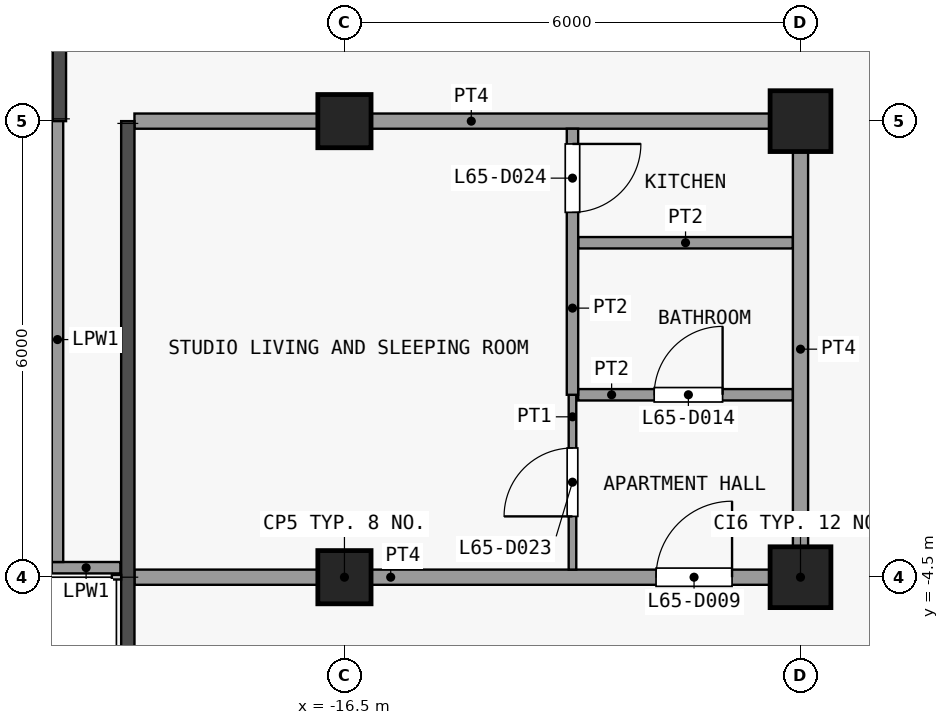
"""IFC4 building model, lengths in metres.
Left out: names, types, materials, properties, quantities, classifications, styles, units other than length and angle.
Written with IfcOpenShell. Run it as: python <this file> out.ifc"""

import sys

from ifc_helpers import new_model, si_unit, direction, frame, frame_2d, origin, origin_2d, place, context, subcontext, project, spatial, rectangle, extrude, element, fill, save


model = new_model("IFC4")
c1 = context("Model", 3, precision=1e-05, world=origin(), true_north=direction((0.0, 1.0)))
c2 = subcontext(c1, "Body", "Model", "MODEL_VIEW")
j1 = project(units=[si_unit("LENGTHUNIT", "METRE"), si_unit("PLANEANGLEUNIT", "RADIAN")], contexts=[c1])
p1 = place(None, origin())
s1 = spatial("IfcSite", under=j1, at=p1, CompositionType="ELEMENT")
p2 = place(p1, origin())
s2 = spatial("IfcBuilding", under=s1, at=p2, CompositionType="ELEMENT")
p3 = place(p2, frame((0.0, 0.0, 259.1)))
s3 = spatial("IfcBuildingStorey", under=s2, at=p3, CompositionType="ELEMENT", Elevation=259.1)
for number, where, z_axis, x_axis in (
    (1, (-16.5, -4.5, 0.0), (0.0, 0.0, 1.0), (1.0, 0.0, 0.0)),
    (2, (-16.5, 1.5, 0.0), (0.0, 0.0, 1.0), (1.0, 0.0, 0.0)),
):
    element("IfcColumn", number, at=place(p3, frame(where, z_axis=z_axis, x_axis=x_axis)), inside=s3, PredefinedType="COLUMN", context=c2, shape_type="SweptSolid", body=[
        extrude(rectangle(XDim=0.7, YDim=0.7, at=origin_2d()), origin(), (0.0, 0.0, 1.0), 3.6),
    ])
for number, where, z_axis, x_axis in (
    (3, (-10.5, -4.5, 0.0), (0.0, 0.0, 1.0), (1.0, 0.0, 0.0)),
    (4, (-10.5, 1.5, 0.0), (0.0, 0.0, 1.0), (1.0, 0.0, 0.0)),
):
    element("IfcColumn", number, at=place(p3, frame(where, z_axis=z_axis, x_axis=x_axis)), inside=s3, PredefinedType="COLUMN", context=c2, shape_type="SweptSolid", body=[
        extrude(rectangle(XDim=0.8, YDim=0.8, at=origin_2d()), origin(), (0.0, 0.0, 1.0), 3.6),
    ])
p4 = place(p3, frame((-19.448, -4.375, 0.0), z_axis=(0.0, 0.0, 1.0), x_axis=(-1.0, 0.0, 0.0)))
e5 = element("IfcWall", 5, at=p4, inside=s3, PredefinedType="PARAPET", context=c2, shape_type="SweptSolid", body=[
    extrude(rectangle(XDim=0.903, YDim=0.15, at=frame_2d((0.451, 0.0))), origin(), (0.0, 0.0, 1.0), 1.15),
])
p5 = place(p3, frame((-20.275, -4.3, 0.0), z_axis=(0.0, 0.0, 1.0), x_axis=(0.0, 1.0, 0.0)))
e6 = element("IfcWall", 6, at=p5, inside=s3, PredefinedType="PARAPET", context=c2, shape_type="SweptSolid", body=[
    extrude(rectangle(XDim=5.853, YDim=0.15, at=frame_2d((2.926, 0.0))), origin(), (0.0, 0.0, 1.0), 1.15),
])
p6 = place(p3, frame((-19.262, -4.5, 0.0), z_axis=(0.0, 0.0, 1.0), x_axis=(1.0, 0.0, 0.0)))
e7 = element("IfcWall", 7, at=p6, inside=s3, PredefinedType="PARTITIONING", context=c2, shape_type="SweptSolid", body=[
    extrude(rectangle(XDim=8.863, YDim=0.2, at=frame_2d((4.431, 0.0))), origin(), (0.0, 0.0, 1.0), 3.3),
])
p7 = place(p6, frame((6.862, 0.0, 0.0)))
e8 = element("IfcOpeningElement", 8, at=p7, cuts=e7, PredefinedType="OPENING", context=c2, shape_type="SweptSolid", body=[
    extrude(rectangle(XDim=1.0, YDim=2.1, at=frame_2d((0.5, 1.05))), frame((0.0, 0.11, 0.0), z_axis=(0.0, -1.0, 0.0), x_axis=(1.0, 0.0, 0.0)), (0.0, 0.0, 1.0), 0.22),
])
p8 = place(p3, frame((-13.425, -2.1, 0.0), z_axis=(0.0, 0.0, 1.0), x_axis=(1.0, 0.0, 0.0)))
e9 = element("IfcWall", 9, at=p8, inside=s3, PredefinedType="PARTITIONING", context=c2, shape_type="SweptSolid", body=[
    extrude(rectangle(XDim=2.825, YDim=0.15, at=frame_2d((1.413, 0.0))), origin(), (0.0, 0.0, 1.0), 3.3),
])
p9 = place(p8, frame((1.0, 0.0, 0.0)))
e10 = element("IfcOpeningElement", 10, at=p9, cuts=e9, PredefinedType="OPENING", context=c2, shape_type="SweptSolid", body=[
    extrude(rectangle(XDim=0.9, YDim=2.1, at=frame_2d((0.45, 1.05))), frame((0.0, 0.085, 0.0), z_axis=(0.0, -1.0, 0.0), x_axis=(1.0, 0.0, 0.0)), (0.0, 0.0, 1.0), 0.17),
])
p10 = place(p3, frame((-13.425, -0.1, 0.0), z_axis=(0.0, 0.0, 1.0), x_axis=(1.0, 0.0, 0.0)))
e11 = element("IfcWall", 11, at=p10, inside=s3, PredefinedType="PARTITIONING", context=c2, shape_type="SweptSolid", body=[
    extrude(rectangle(XDim=2.825, YDim=0.15, at=frame_2d((1.413, 0.0))), origin(), (0.0, 0.0, 1.0), 3.3),
])
p11 = place(p3, frame((-19.262, 1.5, 0.0), z_axis=(0.0, 0.0, 1.0), x_axis=(1.0, 0.0, 0.0)))
e12 = element("IfcWall", 12, at=p11, inside=s3, PredefinedType="PARTITIONING", context=c2, shape_type="SweptSolid", body=[
    extrude(rectangle(XDim=8.863, YDim=0.2, at=frame_2d((4.431, 0.0))), origin(), (0.0, 0.0, 1.0), 3.3),
])
p12 = place(p3, frame((-13.5, -4.4, 0.0), z_axis=(0.0, 0.0, 1.0), x_axis=(0.0, 1.0, 0.0)))
e13 = element("IfcWall", 13, at=p12, inside=s3, PredefinedType="PARTITIONING", context=c2, shape_type="SweptSolid", body=[
    extrude(rectangle(XDim=2.3, YDim=0.1, at=frame_2d((1.15, 0.0))), origin(), (0.0, 0.0, 1.0), 3.3),
])
p13 = place(p12, frame((0.7, 0.0, 0.0)))
e14 = element("IfcOpeningElement", 14, at=p13, cuts=e13, PredefinedType="OPENING", context=c2, shape_type="SweptSolid", body=[
    extrude(rectangle(XDim=0.9, YDim=2.1, at=frame_2d((0.45, 1.05))), frame((0.0, 0.06, 0.0), z_axis=(0.0, -1.0, 0.0), x_axis=(1.0, 0.0, 0.0)), (0.0, 0.0, 1.0), 0.12),
])
p14 = place(p3, frame((-13.5, -2.1, 0.0), z_axis=(0.0, 0.0, 1.0), x_axis=(0.0, 1.0, 0.0)))
e15 = element("IfcWall", 15, at=p14, inside=s3, PredefinedType="PARTITIONING", context=c2, shape_type="SweptSolid", body=[
    extrude(rectangle(XDim=3.5, YDim=0.15, at=frame_2d((1.75, 0.0))), origin(), (0.0, 0.0, 1.0), 3.3),
])
p15 = place(p14, frame((2.4, 0.0, 0.0)))
e16 = element("IfcOpeningElement", 16, at=p15, cuts=e15, PredefinedType="OPENING", context=c2, shape_type="SweptSolid", body=[
    extrude(rectangle(XDim=0.9, YDim=2.1, at=frame_2d((0.45, 1.05))), frame((0.0, 0.085, 0.0), z_axis=(0.0, -1.0, 0.0), x_axis=(1.0, 0.0, 0.0)), (0.0, 0.0, 1.0), 0.17),
])
p16 = place(p3, frame((-10.5, -4.4, 0.0), z_axis=(0.0, 0.0, 1.0), x_axis=(0.0, 1.0, 0.0)))
e17 = element("IfcWall", 17, at=p16, inside=s3, PredefinedType="PARTITIONING", context=c2, shape_type="SweptSolid", body=[
    extrude(rectangle(XDim=5.8, YDim=0.2, at=frame_2d((2.9, 0.0))), origin(), (0.0, 0.0, 1.0), 3.3),
])
p17 = place(p7, origin())
e18 = element("IfcDoor", 18, at=p17, inside=s3, OperationType="SINGLE_SWING_LEFT", PredefinedType="DOOR", context=c2, shape_type="SweptSolid", body=[
    extrude(rectangle(XDim=1.0, YDim=2.1, at=frame_2d((0.5, 1.05))), frame((0.0, 0.025, 0.0), z_axis=(0.0, -1.0, 0.0), x_axis=(1.0, 0.0, 0.0)), (0.0, 0.0, 1.0), 0.05),
])
fill(e8, e18)
p18 = place(p9, origin())
e19 = element("IfcDoor", 19, at=p18, inside=s3, OperationType="SINGLE_SWING_LEFT", PredefinedType="DOOR", context=c2, shape_type="SweptSolid", body=[
    extrude(rectangle(XDim=0.9, YDim=2.1, at=frame_2d((0.45, 1.05))), frame((0.0, 0.025, 0.0), z_axis=(0.0, -1.0, 0.0), x_axis=(1.0, 0.0, 0.0)), (0.0, 0.0, 1.0), 0.05),
])
fill(e10, e19)
p19 = place(p13, origin())
e20 = element("IfcDoor", 20, at=p19, inside=s3, OperationType="SINGLE_SWING_RIGHT", PredefinedType="DOOR", context=c2, shape_type="SweptSolid", body=[
    extrude(rectangle(XDim=0.9, YDim=2.1, at=frame_2d((0.45, 1.05))), frame((0.0, 0.025, 0.0), z_axis=(0.0, -1.0, 0.0), x_axis=(1.0, 0.0, 0.0)), (0.0, 0.0, 1.0), 0.05),
])
fill(e14, e20)
p20 = place(p15, origin())
e21 = element("IfcDoor", 21, at=p20, inside=s3, OperationType="SINGLE_SWING_RIGHT", PredefinedType="DOOR", context=c2, shape_type="SweptSolid", body=[
    extrude(rectangle(XDim=0.9, YDim=2.1, at=frame_2d((0.45, 1.05))), frame((0.0, 0.025, 0.0), z_axis=(0.0, -1.0, 0.0), x_axis=(1.0, 0.0, 0.0)), (0.0, 0.0, 1.0), 0.05),
])
fill(e16, e21)
save(model, sys.argv[1])
